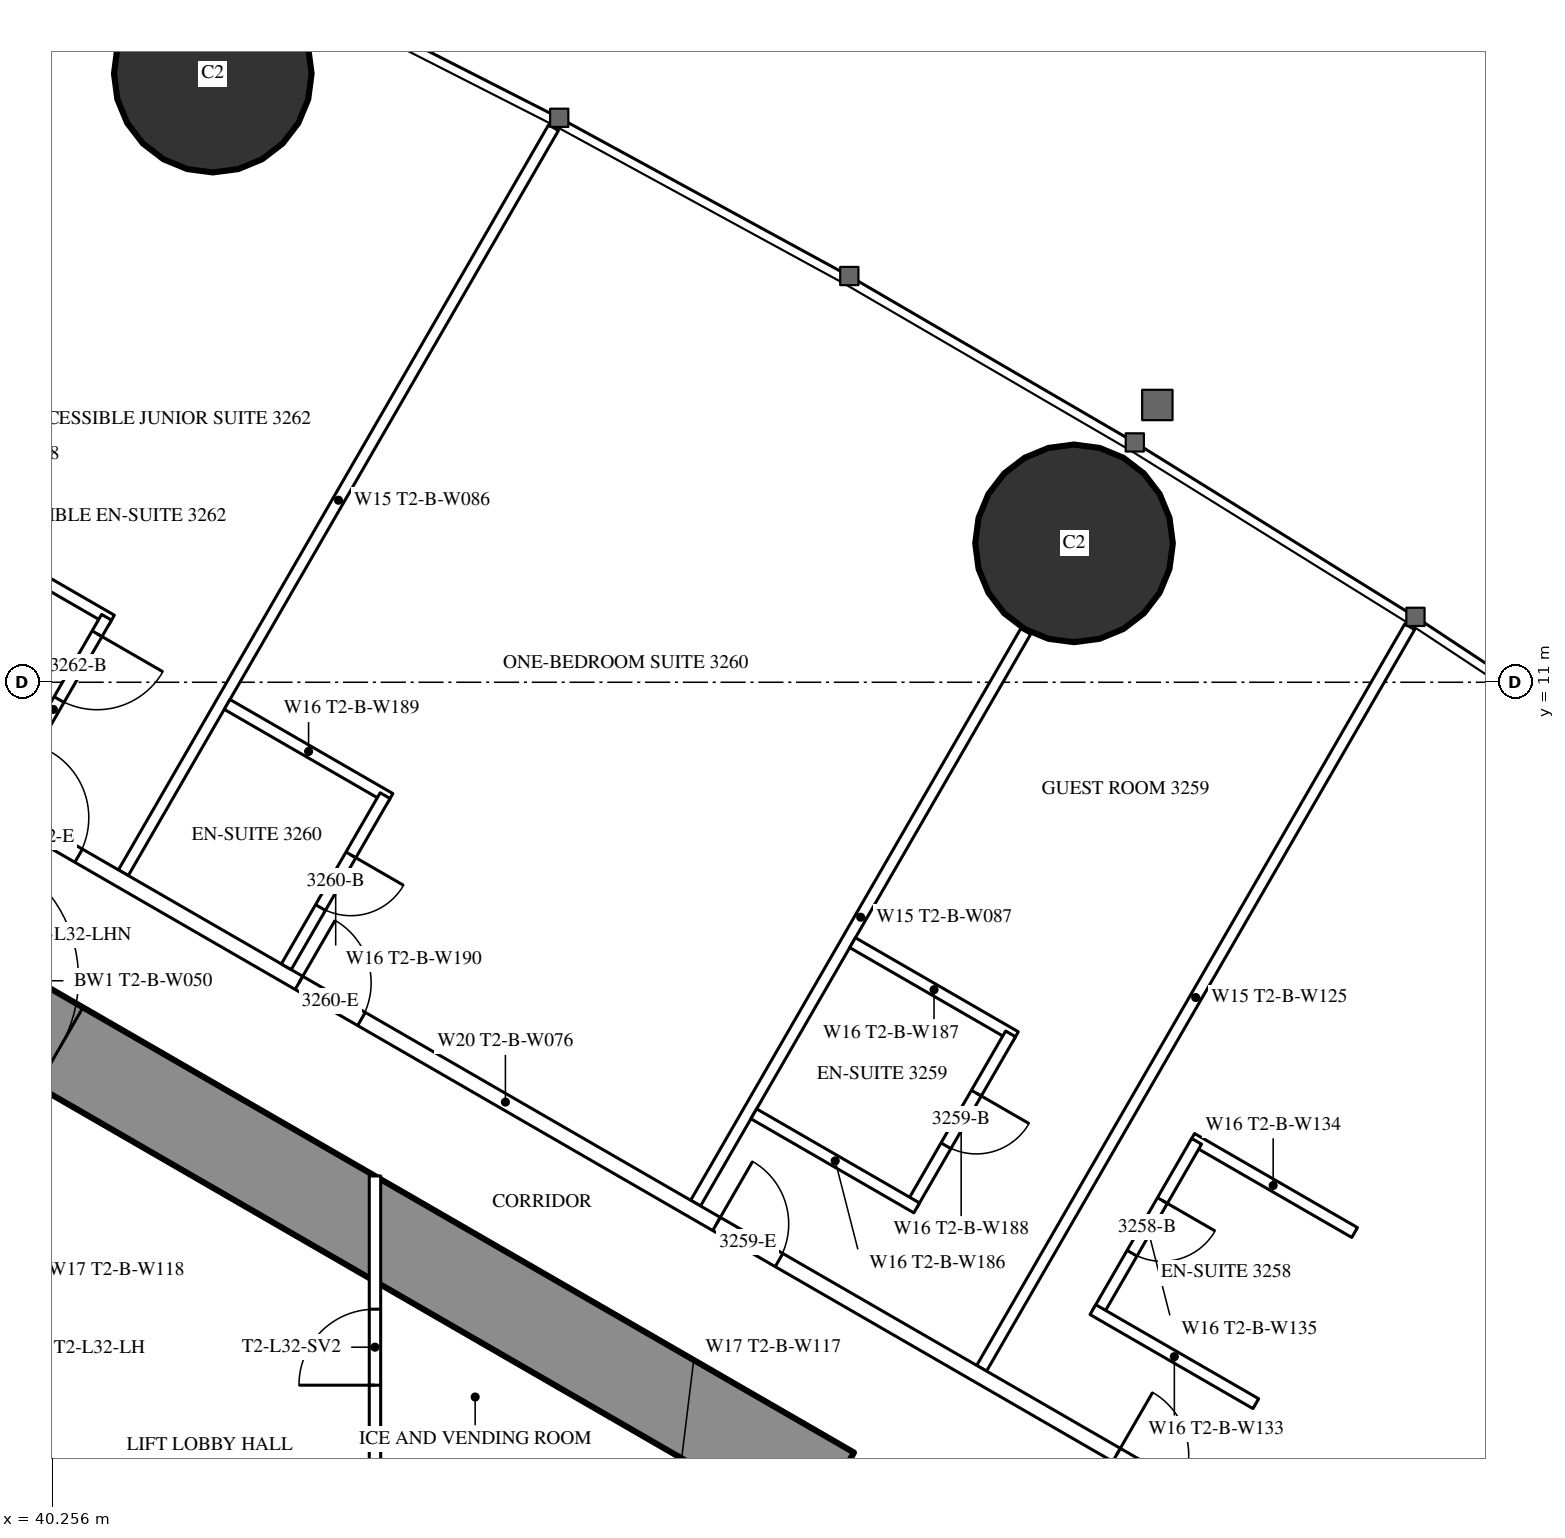
"""IFC4 building model, lengths in metres.
Left out: names, types, materials, properties, quantities, classifications, styles, units other than length and angle.
Written with IfcOpenShell. Run it as: python <this file> out.ifc"""

import sys

from ifc_helpers import new_model, si_unit, direction, frame, frame_2d, origin, origin_2d, place, context, subcontext, project, spatial, rectangle, hollow_circle, extrude, element, fill, save


model = new_model("IFC4")
c1 = context("Model", 3, precision=1e-05, world=origin(), true_north=direction((0.0, 1.0)))
c2 = subcontext(c1, "Body", "Model", "MODEL_VIEW")
j1 = project(units=[si_unit("LENGTHUNIT", "METRE"), si_unit("PLANEANGLEUNIT", "RADIAN")], contexts=[c1])
p1 = place(None, origin())
s1 = spatial("IfcSite", under=j1, at=p1, CompositionType="ELEMENT")
p2 = place(p1, origin())
s2 = spatial("IfcBuilding", under=s1, at=p2, CompositionType="ELEMENT")
p3 = place(p2, frame((0.0, 0.0, 122.1)))
s3 = spatial("IfcBuildingStorey", under=s2, at=p3, CompositionType="ELEMENT", Elevation=122.1)
for number, where, z_axis, x_axis in (
    (1, (53.697, 12.827, 0.0), (0.0, 0.0, 1.0), (1.0, 0.0, 0.0)),
    (2, (42.366, 19.007, 0.0), (0.0, 0.0, 1.0), (1.0, 0.0, 0.0)),
):
    element("IfcColumn", number, at=place(p3, frame(where, z_axis=z_axis, x_axis=x_axis)), inside=s3, PredefinedType="COLUMN", context=c2, shape_type="SweptSolid", body=[
        extrude(hollow_circle(Radius=1.3, WallThickness=0.1, at=origin_2d()), origin(), (0.0, 0.0, 1.0), 3.5),
    ])
p4 = place(p3, frame((27.2, 13.8, 0.0), z_axis=(0.0, 0.0, 1.0), x_axis=(0.866024515034, -0.500001539357, 0.0)))
e3 = element("IfcWall", 3, at=p4, inside=s3, PredefinedType="SHEAR", context=c2, shape_type="SweptSolid", body=[
    extrude(rectangle(XDim=26.907, YDim=1.2, at=frame_2d((13.454, 0.0))), origin(), (0.0, 0.0, 1.0), 3.5),
])
p5 = place(p4, frame((4.6, 0.0, 0.0)))
e4 = element("IfcOpeningElement", 4, at=p5, cuts=e3, PredefinedType="OPENING", context=c2, shape_type="SweptSolid", body=[
    extrude(rectangle(XDim=1.0, YDim=2.2, at=frame_2d((0.5, 1.1))), frame((0.0, 0.61, 0.0), z_axis=(0.0, -1.0, 0.0), x_axis=(1.0, 0.0, 0.0)), (0.0, 0.0, 1.0), 1.22),
])
p6 = place(p4, frame((13.395, 0.0, 0.0)))
e5 = element("IfcOpeningElement", 5, at=p6, cuts=e3, PredefinedType="OPENING", context=c2, shape_type="SweptSolid", body=[
    extrude(rectangle(XDim=1.8, YDim=2.2, at=frame_2d((0.9, 1.1))), frame((0.0, 0.61, 0.0), z_axis=(0.0, -1.0, 0.0), x_axis=(1.0, 0.0, 0.0)), (0.0, 0.0, 1.0), 1.22),
])
p7 = place(p3, frame((41.19, 8.494, 0.0), z_axis=(0.0, 0.0, 1.0), x_axis=(0.49999258054, 0.866029687369, 0.0)))
e6 = element("IfcWall", 6, at=p7, inside=s3, PredefinedType="PARTITIONING", context=c2, shape_type="SweptSolid", body=[
    extrude(rectangle(XDim=11.318, YDim=0.15, at=frame_2d((5.659, 0.0))), origin(), (0.0, 0.0, 1.0), 3.25),
])
p8 = place(p3, frame((48.719, 4.147, 0.0), z_axis=(0.0, 0.0, 1.0), x_axis=(0.499993328235, 0.866029255696, 0.0)))
e7 = element("IfcWall", 7, at=p8, inside=s3, PredefinedType="PARTITIONING", context=c2, shape_type="SweptSolid", body=[
    extrude(rectangle(XDim=8.686, YDim=0.15, at=frame_2d((4.343, 0.0))), origin(), (0.0, 0.0, 1.0), 2.2),
])
p9 = place(p3, frame((52.481, 1.975, 0.0), z_axis=(0.0, 0.0, 1.0), x_axis=(0.500003867771, 0.866023170714, 0.0)))
e8 = element("IfcWall", 8, at=p9, inside=s3, PredefinedType="PARTITIONING", context=c2, shape_type="SweptSolid", body=[
    extrude(rectangle(XDim=11.265, YDim=0.15, at=frame_2d((5.632, 0.0))), origin(), (0.0, 0.0, 1.0), 3.25),
])
p10 = place(p3, frame((36.834, 10.894, 0.0), z_axis=(0.0, 0.0, 1.0), x_axis=(0.866028157229, -0.499995230863, 0.0)))
e9 = element("IfcWall", 9, at=p10, inside=s3, PredefinedType="PARTITIONING", context=c2, shape_type="SweptSolid", body=[
    extrude(rectangle(XDim=21.667, YDim=0.2, at=frame_2d((10.833, 0.0))), origin(), (0.0, 0.0, 1.0), 3.25),
])
p11 = place(p10, frame((20.117, 0.0, 0.0)))
e10 = element("IfcOpeningElement", 10, at=p11, cuts=e9, PredefinedType="OPENING", context=c2, shape_type="SweptSolid", body=[
    extrude(rectangle(XDim=0.95, YDim=2.2, at=frame_2d((0.475, 1.1))), frame((0.0, 0.11, 0.0), z_axis=(0.0, -1.0, 0.0), x_axis=(1.0, 0.0, 0.0)), (0.0, 0.0, 1.0), 0.22),
])
p12 = place(p10, frame((14.04, 0.0, 0.0)))
e11 = element("IfcOpeningElement", 11, at=p12, cuts=e9, PredefinedType="OPENING", context=c2, shape_type="SweptSolid", body=[
    extrude(rectangle(XDim=0.95, YDim=2.2, at=frame_2d((0.475, 1.1))), frame((0.0, 0.11, 0.0), z_axis=(0.0, -1.0, 0.0), x_axis=(1.0, 0.0, 0.0)), (0.0, 0.0, 1.0), 0.22),
])
p13 = place(p10, frame((7.697, 0.0, 0.0)))
e12 = element("IfcOpeningElement", 12, at=p13, cuts=e9, PredefinedType="OPENING", context=c2, shape_type="SweptSolid", body=[
    extrude(rectangle(XDim=0.95, YDim=2.2, at=frame_2d((0.475, 1.1))), frame((0.0, 0.11, 0.0), z_axis=(0.0, -1.0, 0.0), x_axis=(1.0, 0.0, 0.0)), (0.0, 0.0, 1.0), 0.22),
])
p14 = place(p10, frame((3.35, 0.0, 0.0)))
e13 = element("IfcOpeningElement", 13, at=p14, cuts=e9, PredefinedType="OPENING", context=c2, shape_type="SweptSolid", body=[
    extrude(rectangle(XDim=1.0, YDim=2.2, at=frame_2d((0.5, 1.1))), frame((0.0, 0.11, 0.0), z_axis=(0.0, -1.0, 0.0), x_axis=(1.0, 0.0, 0.0)), (0.0, 0.0, 1.0), 0.22),
])
p15 = place(p3, frame((55.245, 4.998, 0.0), z_axis=(0.0, 0.0, 1.0), x_axis=(0.866006523861, -0.500032699561, 0.0)))
e14 = element("IfcWall", 14, at=p15, inside=s3, PredefinedType="PARTITIONING", context=c2, shape_type="SweptSolid", body=[
    extrude(rectangle(XDim=2.475, YDim=0.15, at=frame_2d((1.237, 0.0))), origin(), (0.0, 0.0, 1.0), 3.25),
])
p16 = place(p3, frame((54.01, 2.709, 0.0), z_axis=(0.0, 0.0, 1.0), x_axis=(0.500006934395, 0.866021400173, 0.0)))
e15 = element("IfcWall", 15, at=p16, inside=s3, PredefinedType="PARTITIONING", context=c2, shape_type="SweptSolid", body=[
    extrude(rectangle(XDim=2.6, YDim=0.15, at=frame_2d((1.3, 0.0))), origin(), (0.0, 0.0, 1.0), 3.25),
])
p17 = place(p16, frame((0.9, 0.0, 0.0)))
e16 = element("IfcOpeningElement", 16, at=p17, cuts=e15, PredefinedType="OPENING", context=c2, shape_type="SweptSolid", body=[
    extrude(rectangle(XDim=0.8, YDim=2.2, at=frame_2d((0.4, 1.1))), frame((0.0, 0.085, 0.0), z_axis=(0.0, -1.0, 0.0), x_axis=(1.0, 0.0, 0.0)), (0.0, 0.0, 1.0), 0.17),
])
p18 = place(p3, frame((53.945, 2.747, 0.0), z_axis=(0.0, 0.0, 1.0), x_axis=(0.866031185235, -0.4999899861, 0.0)))
e17 = element("IfcWall", 17, at=p18, inside=s3, PredefinedType="PARTITIONING", context=c2, shape_type="SweptSolid", body=[
    extrude(rectangle(XDim=2.475, YDim=0.15, at=frame_2d((1.238, 0.0))), origin(), (0.0, 0.0, 1.0), 3.25),
])
p19 = place(p3, frame((50.783, 7.574, 0.0), z_axis=(0.0, 0.0, 1.0), x_axis=(0.866006523861, -0.500032699561, 0.0)))
e18 = element("IfcWall", 18, at=p19, inside=s3, PredefinedType="PARTITIONING", context=c2, shape_type="SweptSolid", body=[
    extrude(rectangle(XDim=2.475, YDim=0.15, at=frame_2d((1.237, 0.0))), origin(), (0.0, 0.0, 1.0), 3.25),
])
p20 = place(p3, frame((51.562, 4.123, 0.0), z_axis=(0.0, 0.0, 1.0), x_axis=(0.49997716683, 0.86603858612, 0.0)))
e19 = element("IfcWall", 19, at=p20, inside=s3, PredefinedType="PARTITIONING", context=c2, shape_type="SweptSolid", body=[
    extrude(rectangle(XDim=2.6, YDim=0.15, at=frame_2d((1.3, 0.0))), origin(), (0.0, 0.0, 1.0), 3.25),
])
p21 = place(p20, frame((0.9, 0.0, 0.0)))
e20 = element("IfcOpeningElement", 20, at=p21, cuts=e19, PredefinedType="OPENING", context=c2, shape_type="SweptSolid", body=[
    extrude(rectangle(XDim=0.8, YDim=2.2, at=frame_2d((0.4, 1.1))), frame((0.0, 0.085, 0.0), z_axis=(0.0, -1.0, 0.0), x_axis=(1.0, 0.0, 0.0)), (0.0, 0.0, 1.0), 0.17),
])
for number, where, z_axis, x_axis in (
    (21, (49.483, 5.323, 0.0), (0.0, 0.0, 1.0), (0.866, -0.5, 0.0)),
    (22, (42.555, 10.708, 0.0), (0.0, 0.0, 1.0), (0.866, -0.5, 0.0)),
):
    element("IfcWall", number, at=place(p3, frame(where, z_axis=z_axis, x_axis=x_axis)), inside=s3, PredefinedType="PARTITIONING", context=c2, shape_type="SweptSolid", body=[
        extrude(rectangle(XDim=2.475, YDim=0.15, at=frame_2d((1.238, 0.0))), origin(), (0.0, 0.0, 1.0), 3.25),
    ])
p22 = place(p3, frame((43.333, 7.257, 0.0), z_axis=(0.0, 0.0, 1.0), x_axis=(0.500006934395, 0.866021400173, 0.0)))
e23 = element("IfcWall", 23, at=p22, inside=s3, PredefinedType="PARTITIONING", context=c2, shape_type="SweptSolid", body=[
    extrude(rectangle(XDim=2.6, YDim=0.15, at=frame_2d((1.3, 0.0))), origin(), (0.0, 0.0, 1.0), 3.25),
])
p23 = place(p22, frame((0.9, 0.0, 0.0)))
e24 = element("IfcOpeningElement", 24, at=p23, cuts=e23, PredefinedType="OPENING", context=c2, shape_type="SweptSolid", body=[
    extrude(rectangle(XDim=0.8, YDim=2.2, at=frame_2d((0.4, 1.1))), frame((0.0, 0.085, 0.0), z_axis=(0.0, -1.0, 0.0), x_axis=(1.0, 0.0, 0.0)), (0.0, 0.0, 1.0), 0.17),
])
p24 = place(p3, frame((38.544, 13.255, 0.0), z_axis=(0.0, 0.0, 1.0), x_axis=(0.866018712932, -0.500011588718, 0.0)))
e25 = element("IfcWall", 25, at=p24, inside=s3, PredefinedType="PARTITIONING", context=c2, shape_type="SweptSolid", body=[
    extrude(rectangle(XDim=2.875, YDim=0.15, at=frame_2d((1.438, 0.0))), origin(), (0.0, 0.0, 1.0), 3.25),
])
p25 = place(p3, frame((39.569, 9.43, 0.0), z_axis=(0.0, 0.0, 1.0), x_axis=(0.49998411664, 0.866034573852, 0.0)))
e26 = element("IfcWall", 26, at=p25, inside=s3, PredefinedType="PARTITIONING", context=c2, shape_type="SweptSolid", body=[
    extrude(rectangle(XDim=2.8, YDim=0.15, at=frame_2d((1.4, 0.0))), origin(), (0.0, 0.0, 1.0), 3.25),
])
p26 = place(p25, frame((1.55, 0.0, 0.0)))
e27 = element("IfcOpeningElement", 27, at=p26, cuts=e26, PredefinedType="OPENING", context=c2, shape_type="SweptSolid", body=[
    extrude(rectangle(XDim=1.0, YDim=2.2, at=frame_2d((0.5, 1.1))), frame((0.0, 0.085, 0.0), z_axis=(0.0, -1.0, 0.0), x_axis=(1.0, 0.0, 0.0)), (0.0, 0.0, 1.0), 0.17),
])
p27 = place(p3, frame((44.5, -4.505, 0.0), z_axis=(0.0, 0.0, 1.0), x_axis=(0.0, 1.0, 0.0)))
e28 = element("IfcWall", 28, at=p27, inside=s3, PredefinedType="PARTITIONING", context=c2, shape_type="SweptSolid", body=[
    extrude(rectangle(XDim=9.009, YDim=0.15, at=frame_2d((4.505, 0.0))), origin(), (0.0, 0.0, 1.0), 2.45),
])
p28 = place(p27, frame((1.752, 0.0, 0.0)))
e29 = element("IfcOpeningElement", 29, at=p28, cuts=e28, PredefinedType="OPENING", context=c2, shape_type="SweptSolid", body=[
    extrude(rectangle(XDim=1.0, YDim=2.2, at=frame_2d((0.5, 1.1))), frame((0.0, 0.085, 0.0), z_axis=(0.0, -1.0, 0.0), x_axis=(1.0, 0.0, 0.0)), (0.0, 0.0, 1.0), 0.17),
])
p29 = place(p27, frame((6.257, 0.0, 0.0)))
e30 = element("IfcOpeningElement", 30, at=p29, cuts=e28, PredefinedType="OPENING", context=c2, shape_type="SweptSolid", body=[
    extrude(rectangle(XDim=1.0, YDim=2.2, at=frame_2d((0.5, 1.1))), frame((0.0, 0.085, 0.0), z_axis=(0.0, -1.0, 0.0), x_axis=(1.0, 0.0, 0.0)), (0.0, 0.0, 1.0), 0.17),
])
p30 = place(p17, origin())
e31 = element("IfcDoor", 31, at=p30, inside=s3, OperationType="SINGLE_SWING_RIGHT", PredefinedType="DOOR", context=c2, shape_type="SweptSolid", body=[
    extrude(rectangle(XDim=0.8, YDim=2.2, at=frame_2d((0.4, 1.1))), frame((0.0, 0.025, 0.0), z_axis=(0.0, -1.0, 0.0), x_axis=(1.0, 0.0, 0.0)), (0.0, 0.0, 1.0), 0.05),
])
fill(e16, e31)
p31 = place(p11, origin())
e32 = element("IfcDoor", 32, at=p31, inside=s3, OperationType="SINGLE_SWING_LEFT", PredefinedType="DOOR", context=c2, shape_type="SweptSolid", body=[
    extrude(rectangle(XDim=0.95, YDim=2.2, at=frame_2d((0.475, 1.1))), frame((0.0, 0.025, 0.0), z_axis=(0.0, -1.0, 0.0), x_axis=(1.0, 0.0, 0.0)), (0.0, 0.0, 1.0), 0.05),
])
fill(e10, e32)
p32 = place(p21, origin())
e33 = element("IfcDoor", 33, at=p32, inside=s3, OperationType="SINGLE_SWING_RIGHT", PredefinedType="DOOR", context=c2, shape_type="SweptSolid", body=[
    extrude(rectangle(XDim=0.8, YDim=2.2, at=frame_2d((0.4, 1.1))), frame((0.0, 0.025, 0.0), z_axis=(0.0, -1.0, 0.0), x_axis=(1.0, 0.0, 0.0)), (0.0, 0.0, 1.0), 0.05),
])
fill(e20, e33)
p33 = place(p12, origin())
e34 = element("IfcDoor", 34, at=p33, inside=s3, OperationType="SINGLE_SWING_LEFT", PredefinedType="DOOR", context=c2, shape_type="SweptSolid", body=[
    extrude(rectangle(XDim=0.95, YDim=2.2, at=frame_2d((0.475, 1.1))), frame((0.0, 0.025, 0.0), z_axis=(0.0, -1.0, 0.0), x_axis=(1.0, 0.0, 0.0)), (0.0, 0.0, 1.0), 0.05),
])
fill(e11, e34)
p34 = place(p23, origin())
e35 = element("IfcDoor", 35, at=p34, inside=s3, OperationType="SINGLE_SWING_RIGHT", PredefinedType="DOOR", context=c2, shape_type="SweptSolid", body=[
    extrude(rectangle(XDim=0.8, YDim=2.2, at=frame_2d((0.4, 1.1))), frame((0.0, 0.025, 0.0), z_axis=(0.0, -1.0, 0.0), x_axis=(1.0, 0.0, 0.0)), (0.0, 0.0, 1.0), 0.05),
])
fill(e24, e35)
p35 = place(p13, origin())
e36 = element("IfcDoor", 36, at=p35, inside=s3, OperationType="SINGLE_SWING_LEFT", PredefinedType="DOOR", context=c2, shape_type="SweptSolid", body=[
    extrude(rectangle(XDim=0.95, YDim=2.2, at=frame_2d((0.475, 1.1))), frame((0.0, 0.025, 0.0), z_axis=(0.0, -1.0, 0.0), x_axis=(1.0, 0.0, 0.0)), (0.0, 0.0, 1.0), 0.05),
])
fill(e12, e36)
p36 = place(p26, origin())
e37 = element("IfcDoor", 37, at=p36, inside=s3, OperationType="SINGLE_SWING_RIGHT", PredefinedType="DOOR", context=c2, shape_type="SweptSolid", body=[
    extrude(rectangle(XDim=1.0, YDim=2.2, at=frame_2d((0.5, 1.1))), frame((0.0, 0.025, 0.0), z_axis=(0.0, -1.0, 0.0), x_axis=(1.0, 0.0, 0.0)), (0.0, 0.0, 1.0), 0.05),
])
fill(e27, e37)
p37 = place(p14, origin())
e38 = element("IfcDoor", 38, at=p37, inside=s3, OperationType="SINGLE_SWING_LEFT", PredefinedType="DOOR", context=c2, shape_type="SweptSolid", body=[
    extrude(rectangle(XDim=1.0, YDim=2.2, at=frame_2d((0.5, 1.1))), frame((0.0, 0.025, 0.0), z_axis=(0.0, -1.0, 0.0), x_axis=(1.0, 0.0, 0.0)), (0.0, 0.0, 1.0), 0.05),
])
fill(e13, e38)
p38 = place(p29, origin())
e39 = element("IfcDoor", 39, at=p38, inside=s3, OperationType="SINGLE_SWING_LEFT", PredefinedType="DOOR", context=c2, shape_type="SweptSolid", body=[
    extrude(rectangle(XDim=1.0, YDim=2.2, at=frame_2d((0.5, 1.1))), frame((0.0, 0.025, 0.0), z_axis=(0.0, -1.0, 0.0), x_axis=(1.0, 0.0, 0.0)), (0.0, 0.0, 1.0), 0.05),
])
fill(e30, e39)
p39 = place(p6, origin())
e40 = element("IfcDoor", 40, at=p39, inside=s3, OperationType="DOUBLE_DOOR_SINGLE_SWING", PredefinedType="DOOR", context=c2, shape_type="SweptSolid", body=[
    extrude(rectangle(XDim=1.8, YDim=2.2, at=frame_2d((0.9, 1.1))), frame((0.0, 0.025, 0.0), z_axis=(0.0, -1.0, 0.0), x_axis=(1.0, 0.0, 0.0)), (0.0, 0.0, 1.0), 0.05),
])
fill(e5, e40)
save(model, sys.argv[1])
